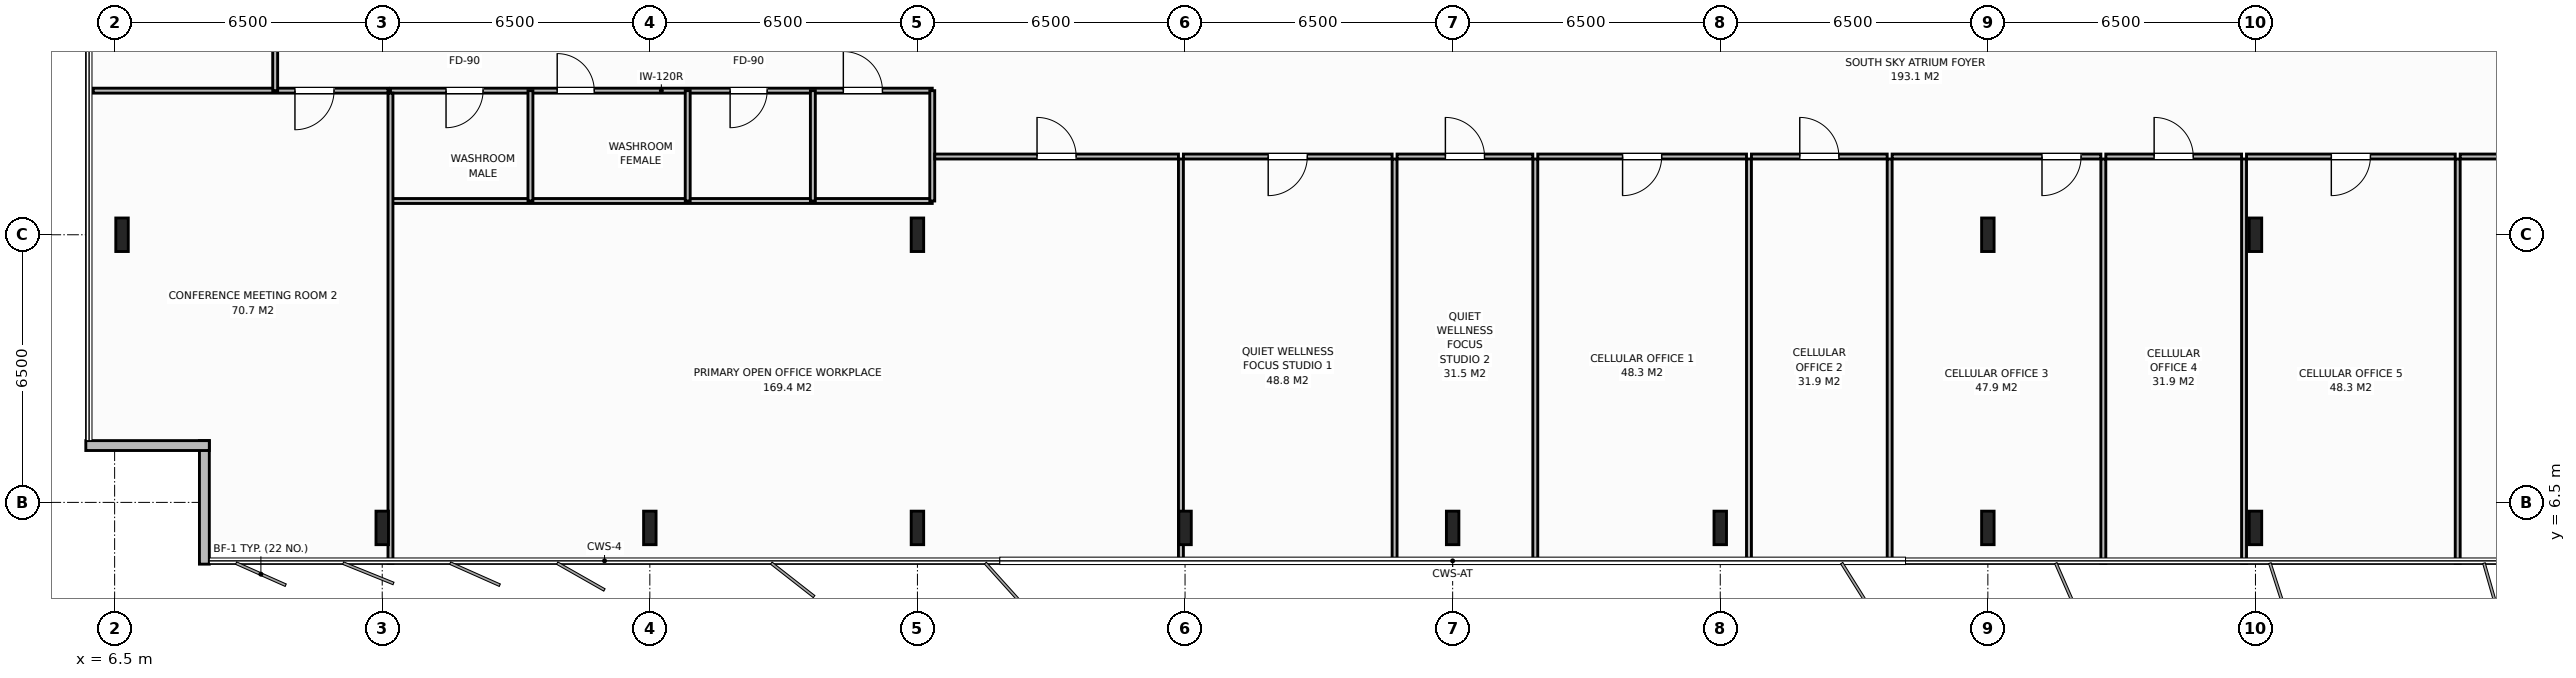
"""IFC4 building model, lengths in metres.
Left out: names, types, materials, properties, quantities, classifications, styles, units other than length and angle.
Written with IfcOpenShell. Run it as: python <this file> out.ifc"""

import sys

from ifc_helpers import new_model, si_unit, direction, frame, frame_2d, origin, origin_2d, place, context, subcontext, project, spatial, rectangle, i_section, extrude, element, fill, save


model = new_model("IFC4")
c1 = context("Model", 3, precision=1e-05, world=origin(), true_north=direction((0.0, 1.0)))
c2 = subcontext(c1, "Body", "Model", "MODEL_VIEW")
j1 = project(units=[si_unit("LENGTHUNIT", "METRE"), si_unit("PLANEANGLEUNIT", "RADIAN")], contexts=[c1])
p1 = place(None, origin())
s1 = spatial("IfcSite", under=j1, at=p1, CompositionType="ELEMENT")
p2 = place(p1, origin())
s2 = spatial("IfcBuilding", under=s1, at=p2, CompositionType="ELEMENT")
p3 = place(p2, frame((0.0, 0.0, 244.2)))
s3 = spatial("IfcBuildingStorey", under=s2, at=p3, CompositionType="ELEMENT", Elevation=244.2)
for number, where, z_axis, x_axis in (
    (1, (58.5, 13.0, 0.0), (0.0, 0.0, 1.0), (1.0, 0.0, 0.0)),
    (2, (26.0, 13.0, 0.0), (0.0, 0.0, 1.0), (1.0, 0.0, 0.0)),
    (3, (52.0, 13.0, 0.0), (0.0, 0.0, 1.0), (1.0, 0.0, 0.0)),
    (4, (13.0, 5.88, 0.0), (0.0, 0.0, 1.0), (1.0, 0.0, 0.0)),
    (5, (19.5, 5.88, 0.0), (0.0, 0.0, 1.0), (1.0, 0.0, 0.0)),
    (6, (26.0, 5.88, 0.0), (0.0, 0.0, 1.0), (1.0, 0.0, 0.0)),
    (7, (32.5, 5.88, 0.0), (0.0, 0.0, 1.0), (1.0, 0.0, 0.0)),
    (8, (39.0, 5.88, 0.0), (0.0, 0.0, 1.0), (1.0, 0.0, 0.0)),
    (9, (45.5, 5.88, 0.0), (0.0, 0.0, 1.0), (1.0, 0.0, 0.0)),
    (10, (52.0, 5.88, 0.0), (0.0, 0.0, 1.0), (1.0, 0.0, 0.0)),
    (11, (58.5, 5.88, 0.0), (0.0, 0.0, 1.0), (1.0, 0.0, 0.0)),
    (12, (6.68, 13.0, 0.0), (0.0, 0.0, 1.0), (1.0, 0.0, 0.0)),
):
    element("IfcColumn", number, at=place(p3, frame(where, z_axis=z_axis, x_axis=x_axis)), inside=s3, PredefinedType="COLUMN", context=c2, shape_type="SweptSolid", body=[
        extrude(i_section(OverallWidth=0.303, OverallDepth=0.814, WebThickness=0.021, FlangeThickness=0.04, at=origin_2d()), origin(), (0.0, 0.0, 1.0), 3.8),
    ])
for number, where, z_axis, x_axis in (
    (13, (8.68, 5.0, 0.0), (0.0, 0.0, 1.0), (0.0, 1.0, 0.0)),
    (14, (8.8, 7.88, 0.0), (0.0, 0.0, 1.0), (-1.0, 0.0, 0.0)),
):
    element("IfcWall", number, at=place(p3, frame(where, z_axis=z_axis, x_axis=x_axis)), inside=s3, PredefinedType="STANDARD", context=c2, shape_type="SweptSolid", body=[
        extrude(rectangle(XDim=3.0, YDim=0.24, at=frame_2d((1.5, 0.0))), origin(), (0.0, 0.0, 1.0), 3.58),
    ])
p4 = place(p3, frame((13.2, 16.5, 0.0), z_axis=(0.0, 0.0, 1.0), x_axis=(1.0, 0.0, 0.0)))
e15 = element("IfcWall", 15, at=p4, inside=s3, PredefinedType="PARTITIONING", context=c2, shape_type="SweptSolid", body=[
    extrude(rectangle(XDim=13.16, YDim=0.12, at=frame_2d((6.58, 0.0))), origin(), (0.0, 0.0, 1.0), 3.58),
])
p5 = place(p4, frame((1.35, 0.0, 0.0)))
e16 = element("IfcOpeningElement", 16, at=p5, cuts=e15, PredefinedType="OPENING", context=c2, shape_type="SweptSolid", body=[
    extrude(rectangle(XDim=0.9, YDim=2.15, at=frame_2d((0.45, 1.075))), frame((0.0, 0.07, 0.0), z_axis=(0.0, -1.0, 0.0), x_axis=(1.0, 0.0, 0.0)), (0.0, 0.0, 1.0), 0.14),
])
p6 = place(p4, frame((4.05, 0.0, 0.0)))
e17 = element("IfcOpeningElement", 17, at=p6, cuts=e15, PredefinedType="OPENING", context=c2, shape_type="SweptSolid", body=[
    extrude(rectangle(XDim=0.9, YDim=2.15, at=frame_2d((0.45, 1.075))), frame((0.0, 0.07, 0.0), z_axis=(0.0, -1.0, 0.0), x_axis=(1.0, 0.0, 0.0)), (0.0, 0.0, 1.0), 0.14),
])
p7 = place(p4, frame((8.25, 0.0, 0.0)))
e18 = element("IfcOpeningElement", 18, at=p7, cuts=e15, PredefinedType="OPENING", context=c2, shape_type="SweptSolid", body=[
    extrude(rectangle(XDim=0.9, YDim=2.15, at=frame_2d((0.45, 1.075))), frame((0.0, 0.07, 0.0), z_axis=(0.0, -1.0, 0.0), x_axis=(1.0, 0.0, 0.0)), (0.0, 0.0, 1.0), 0.14),
])
p8 = place(p4, frame((11.0, 0.0, 0.0)))
e19 = element("IfcOpeningElement", 19, at=p8, cuts=e15, PredefinedType="OPENING", context=c2, shape_type="SweptSolid", body=[
    extrude(rectangle(XDim=0.95, YDim=2.15, at=frame_2d((0.475, 1.075))), frame((0.0, 0.07, 0.0), z_axis=(0.0, -1.0, 0.0), x_axis=(1.0, 0.0, 0.0)), (0.0, 0.0, 1.0), 0.14),
])
p9 = place(p3, frame((13.2, 13.82, 0.0), z_axis=(0.0, 0.0, 1.0), x_axis=(1.0, 0.0, 0.0)))
e20 = element("IfcWall", 20, at=p9, inside=s3, PredefinedType="PARTITIONING", context=c2, shape_type="SweptSolid", body=[
    extrude(rectangle(XDim=13.16, YDim=0.12, at=frame_2d((6.58, 0.0))), origin(), (0.0, 0.0, 1.0), 3.58),
])
for number, where, z_axis, x_axis in (
    (21, (16.6, 13.82, 0.0), (0.0, 0.0, 1.0), (0.0, 1.0, 0.0)),
    (22, (20.42, 13.82, 0.0), (0.0, 0.0, 1.0), (0.0, 1.0, 0.0)),
    (23, (23.46, 13.82, 0.0), (0.0, 0.0, 1.0), (0.0, 1.0, 0.0)),
    (24, (26.36, 13.82, 0.0), (0.0, 0.0, 1.0), (0.0, 1.0, 0.0)),
):
    element("IfcWall", number, at=place(p3, frame(where, z_axis=z_axis, x_axis=x_axis)), inside=s3, PredefinedType="PARTITIONING", context=c2, shape_type="SweptSolid", body=[
        extrude(rectangle(XDim=2.68, YDim=0.12, at=frame_2d((1.34, 0.0))), origin(), (0.0, 0.0, 1.0), 3.58),
    ])
p10 = place(p3, frame((13.2, 5.02, 0.0), z_axis=(0.0, 0.0, 1.0), x_axis=(0.0, 1.0, 0.0)))
e25 = element("IfcWall", 25, at=p10, inside=s3, PredefinedType="PARTITIONING", context=c2, shape_type="SweptSolid", body=[
    extrude(rectangle(XDim=11.42, YDim=0.12, at=frame_2d((5.71, 0.0))), origin(), (0.0, 0.0, 1.0), 2.88),
])
p11 = place(p3, frame((5.98, 16.5, 0.0), z_axis=(0.0, 0.0, 1.0), x_axis=(1.0, 0.0, 0.0)))
e26 = element("IfcWall", 26, at=p11, inside=s3, PredefinedType="PARTITIONING", context=c2, shape_type="SweptSolid", body=[
    extrude(rectangle(XDim=7.16, YDim=0.12, at=frame_2d((3.58, 0.0))), origin(), (0.0, 0.0, 1.0), 3.58),
])
p12 = place(p11, frame((4.9, 0.0, 0.0)))
e27 = element("IfcOpeningElement", 27, at=p12, cuts=e26, PredefinedType="OPENING", context=c2, shape_type="SweptSolid", body=[
    extrude(rectangle(XDim=0.95, YDim=2.15, at=frame_2d((0.475, 1.075))), frame((0.0, 0.07, 0.0), z_axis=(0.0, -1.0, 0.0), x_axis=(1.0, 0.0, 0.0)), (0.0, 0.0, 1.0), 0.14),
])
p13 = place(p3, frame((32.4, 5.02, 0.0), z_axis=(0.0, 0.0, 1.0), x_axis=(0.0, 1.0, 0.0)))
e28 = element("IfcWall", 28, at=p13, inside=s3, PredefinedType="PARTITIONING", context=c2, shape_type="SweptSolid", body=[
    extrude(rectangle(XDim=9.82, YDim=0.12, at=frame_2d((4.91, 0.0))), origin(), (0.0, 0.0, 1.0), 2.88),
])
p14 = place(p3, frame((26.42, 14.9, 0.0), z_axis=(0.0, 0.0, 1.0), x_axis=(1.0, 0.0, 0.0)))
e29 = element("IfcWall", 29, at=p14, inside=s3, PredefinedType="PARTITIONING", context=c2, shape_type="SweptSolid", body=[
    extrude(rectangle(XDim=5.92, YDim=0.12, at=frame_2d((2.96, 0.0))), origin(), (0.0, 0.0, 1.0), 3.58),
])
p15 = place(p14, frame((2.485, 0.0, 0.0)))
e30 = element("IfcOpeningElement", 30, at=p15, cuts=e29, PredefinedType="OPENING", context=c2, shape_type="SweptSolid", body=[
    extrude(rectangle(XDim=0.95, YDim=2.15, at=frame_2d((0.475, 1.075))), frame((0.0, 0.07, 0.0), z_axis=(0.0, -1.0, 0.0), x_axis=(1.0, 0.0, 0.0)), (0.0, 0.0, 1.0), 0.14),
])
p16 = place(p3, frame((37.59, 5.02, 0.0), z_axis=(0.0, 0.0, 1.0), x_axis=(0.0, 1.0, 0.0)))
e31 = element("IfcWall", 31, at=p16, inside=s3, PredefinedType="PARTITIONING", context=c2, shape_type="SweptSolid", body=[
    extrude(rectangle(XDim=9.82, YDim=0.12, at=frame_2d((4.91, 0.0))), origin(), (0.0, 0.0, 1.0), 3.58),
])
p17 = place(p3, frame((32.46, 14.9, 0.0), z_axis=(0.0, 0.0, 1.0), x_axis=(1.0, 0.0, 0.0)))
e32 = element("IfcWall", 32, at=p17, inside=s3, PredefinedType="PARTITIONING", context=c2, shape_type="SweptSolid", body=[
    extrude(rectangle(XDim=5.07, YDim=0.12, at=frame_2d((2.535, 0.0))), origin(), (0.0, 0.0, 1.0), 3.58),
])
p18 = place(p17, frame((2.06, 0.0, 0.0)))
e33 = element("IfcOpeningElement", 33, at=p18, cuts=e32, PredefinedType="OPENING", context=c2, shape_type="SweptSolid", body=[
    extrude(rectangle(XDim=0.95, YDim=2.15, at=frame_2d((0.475, 1.075))), frame((0.0, 0.07, 0.0), z_axis=(0.0, -1.0, 0.0), x_axis=(1.0, 0.0, 0.0)), (0.0, 0.0, 1.0), 0.14),
])
p19 = place(p3, frame((41.008, 5.02, 0.0), z_axis=(0.0, 0.0, 1.0), x_axis=(0.0, 1.0, 0.0)))
e34 = element("IfcWall", 34, at=p19, inside=s3, PredefinedType="PARTITIONING", context=c2, shape_type="SweptSolid", body=[
    extrude(rectangle(XDim=9.82, YDim=0.12, at=frame_2d((4.91, 0.0))), origin(), (0.0, 0.0, 1.0), 3.58),
])
p20 = place(p3, frame((37.65, 14.9, 0.0), z_axis=(0.0, 0.0, 1.0), x_axis=(1.0, 0.0, 0.0)))
e35 = element("IfcWall", 35, at=p20, inside=s3, PredefinedType="PARTITIONING", context=c2, shape_type="SweptSolid", body=[
    extrude(rectangle(XDim=3.298, YDim=0.12, at=frame_2d((1.649, 0.0))), origin(), (0.0, 0.0, 1.0), 3.58),
])
p21 = place(p20, frame((1.174, 0.0, 0.0)))
e36 = element("IfcOpeningElement", 36, at=p21, cuts=e35, PredefinedType="OPENING", context=c2, shape_type="SweptSolid", body=[
    extrude(rectangle(XDim=0.95, YDim=2.15, at=frame_2d((0.475, 1.075))), frame((0.0, 0.07, 0.0), z_axis=(0.0, -1.0, 0.0), x_axis=(1.0, 0.0, 0.0)), (0.0, 0.0, 1.0), 0.14),
])
p22 = place(p3, frame((46.198, 5.02, 0.0), z_axis=(0.0, 0.0, 1.0), x_axis=(0.0, 1.0, 0.0)))
e37 = element("IfcWall", 37, at=p22, inside=s3, PredefinedType="PARTITIONING", context=c2, shape_type="SweptSolid", body=[
    extrude(rectangle(XDim=9.82, YDim=0.12, at=frame_2d((4.91, 0.0))), origin(), (0.0, 0.0, 1.0), 3.58),
])
p23 = place(p3, frame((41.067, 14.9, 0.0), z_axis=(0.0, 0.0, 1.0), x_axis=(1.0, 0.0, 0.0)))
e38 = element("IfcWall", 38, at=p23, inside=s3, PredefinedType="PARTITIONING", context=c2, shape_type="SweptSolid", body=[
    extrude(rectangle(XDim=5.07, YDim=0.12, at=frame_2d((2.535, 0.0))), origin(), (0.0, 0.0, 1.0), 3.58),
])
p24 = place(p23, frame((2.06, 0.0, 0.0)))
e39 = element("IfcOpeningElement", 39, at=p24, cuts=e38, PredefinedType="OPENING", context=c2, shape_type="SweptSolid", body=[
    extrude(rectangle(XDim=0.95, YDim=2.15, at=frame_2d((0.475, 1.075))), frame((0.0, 0.07, 0.0), z_axis=(0.0, -1.0, 0.0), x_axis=(1.0, 0.0, 0.0)), (0.0, 0.0, 1.0), 0.14),
])
p25 = place(p3, frame((49.615, 5.02, 0.0), z_axis=(0.0, 0.0, 1.0), x_axis=(0.0, 1.0, 0.0)))
e40 = element("IfcWall", 40, at=p25, inside=s3, PredefinedType="PARTITIONING", context=c2, shape_type="SweptSolid", body=[
    extrude(rectangle(XDim=9.82, YDim=0.12, at=frame_2d((4.91, 0.0))), origin(), (0.0, 0.0, 1.0), 3.58),
])
p26 = place(p3, frame((46.257, 14.9, 0.0), z_axis=(0.0, 0.0, 1.0), x_axis=(1.0, 0.0, 0.0)))
e41 = element("IfcWall", 41, at=p26, inside=s3, PredefinedType="PARTITIONING", context=c2, shape_type="SweptSolid", body=[
    extrude(rectangle(XDim=3.298, YDim=0.12, at=frame_2d((1.649, 0.0))), origin(), (0.0, 0.0, 1.0), 3.58),
])
p27 = place(p26, frame((1.174, 0.0, 0.0)))
e42 = element("IfcOpeningElement", 42, at=p27, cuts=e41, PredefinedType="OPENING", context=c2, shape_type="SweptSolid", body=[
    extrude(rectangle(XDim=0.95, YDim=2.15, at=frame_2d((0.475, 1.075))), frame((0.0, 0.07, 0.0), z_axis=(0.0, -1.0, 0.0), x_axis=(1.0, 0.0, 0.0)), (0.0, 0.0, 1.0), 0.14),
])
p28 = place(p3, frame((54.805, 5.02, 0.0), z_axis=(0.0, 0.0, 1.0), x_axis=(0.0, 1.0, 0.0)))
e43 = element("IfcWall", 43, at=p28, inside=s3, PredefinedType="PARTITIONING", context=c2, shape_type="SweptSolid", body=[
    extrude(rectangle(XDim=9.82, YDim=0.12, at=frame_2d((4.91, 0.0))), origin(), (0.0, 0.0, 1.0), 3.58),
])
p29 = place(p3, frame((49.675, 14.9, 0.0), z_axis=(0.0, 0.0, 1.0), x_axis=(1.0, 0.0, 0.0)))
e44 = element("IfcWall", 44, at=p29, inside=s3, PredefinedType="PARTITIONING", context=c2, shape_type="SweptSolid", body=[
    extrude(rectangle(XDim=5.07, YDim=0.12, at=frame_2d((2.535, 0.0))), origin(), (0.0, 0.0, 1.0), 3.58),
])
p30 = place(p29, frame((3.64, 0.0, 0.0)))
e45 = element("IfcOpeningElement", 45, at=p30, cuts=e44, PredefinedType="OPENING", context=c2, shape_type="SweptSolid", body=[
    extrude(rectangle(XDim=0.95, YDim=2.15, at=frame_2d((0.475, 1.075))), frame((0.0, 0.07, 0.0), z_axis=(0.0, -1.0, 0.0), x_axis=(1.0, 0.0, 0.0)), (0.0, 0.0, 1.0), 0.14),
])
p31 = place(p3, frame((58.223, 5.02, 0.0), z_axis=(0.0, 0.0, 1.0), x_axis=(0.0, 1.0, 0.0)))
e46 = element("IfcWall", 46, at=p31, inside=s3, PredefinedType="PARTITIONING", context=c2, shape_type="SweptSolid", body=[
    extrude(rectangle(XDim=9.82, YDim=0.12, at=frame_2d((4.91, 0.0))), origin(), (0.0, 0.0, 1.0), 3.58),
])
p32 = place(p3, frame((54.865, 14.9, 0.0), z_axis=(0.0, 0.0, 1.0), x_axis=(1.0, 0.0, 0.0)))
e47 = element("IfcWall", 47, at=p32, inside=s3, PredefinedType="PARTITIONING", context=c2, shape_type="SweptSolid", body=[
    extrude(rectangle(XDim=3.298, YDim=0.12, at=frame_2d((1.649, 0.0))), origin(), (0.0, 0.0, 1.0), 3.58),
])
p33 = place(p32, frame((1.174, 0.0, 0.0)))
e48 = element("IfcOpeningElement", 48, at=p33, cuts=e47, PredefinedType="OPENING", context=c2, shape_type="SweptSolid", body=[
    extrude(rectangle(XDim=0.95, YDim=2.15, at=frame_2d((0.475, 1.075))), frame((0.0, 0.07, 0.0), z_axis=(0.0, -1.0, 0.0), x_axis=(1.0, 0.0, 0.0)), (0.0, 0.0, 1.0), 0.14),
])
p34 = place(p3, frame((63.413, 5.02, 0.0), z_axis=(0.0, 0.0, 1.0), x_axis=(0.0, 1.0, 0.0)))
e49 = element("IfcWall", 49, at=p34, inside=s3, PredefinedType="PARTITIONING", context=c2, shape_type="SweptSolid", body=[
    extrude(rectangle(XDim=9.82, YDim=0.12, at=frame_2d((4.91, 0.0))), origin(), (0.0, 0.0, 1.0), 3.58),
])
p35 = place(p3, frame((58.283, 14.9, 0.0), z_axis=(0.0, 0.0, 1.0), x_axis=(1.0, 0.0, 0.0)))
e50 = element("IfcWall", 50, at=p35, inside=s3, PredefinedType="PARTITIONING", context=c2, shape_type="SweptSolid", body=[
    extrude(rectangle(XDim=5.07, YDim=0.12, at=frame_2d((2.535, 0.0))), origin(), (0.0, 0.0, 1.0), 3.58),
])
p36 = place(p35, frame((2.06, 0.0, 0.0)))
e51 = element("IfcOpeningElement", 51, at=p36, cuts=e50, PredefinedType="OPENING", context=c2, shape_type="SweptSolid", body=[
    extrude(rectangle(XDim=0.95, YDim=2.15, at=frame_2d((0.475, 1.075))), frame((0.0, 0.07, 0.0), z_axis=(0.0, -1.0, 0.0), x_axis=(1.0, 0.0, 0.0)), (0.0, 0.0, 1.0), 0.14),
])
p37 = place(p3, frame((63.472, 14.9, 0.0), z_axis=(0.0, 0.0, 1.0), x_axis=(1.0, 0.0, 0.0)))
e52 = element("IfcWall", 52, at=p37, inside=s3, PredefinedType="PARTITIONING", context=c2, shape_type="SweptSolid", body=[
    extrude(rectangle(XDim=3.298, YDim=0.12, at=frame_2d((1.649, 0.0))), origin(), (0.0, 0.0, 1.0), 3.58),
])
p38 = place(p37, frame((1.174, 0.0, 0.0)))
e53 = element("IfcOpeningElement", 53, at=p38, cuts=e52, PredefinedType="OPENING", context=c2, shape_type="SweptSolid", body=[
    extrude(rectangle(XDim=0.95, YDim=2.15, at=frame_2d((0.475, 1.075))), frame((0.0, 0.07, 0.0), z_axis=(0.0, -1.0, 0.0), x_axis=(1.0, 0.0, 0.0)), (0.0, 0.0, 1.0), 0.14),
])
p39 = place(p3, frame((10.4, 16.5, 0.0), z_axis=(0.0, 0.0, 1.0), x_axis=(0.0, 1.0, 0.0)))
e54 = element("IfcWall", 54, at=p39, inside=s3, PredefinedType="PARTITIONING", context=c2, shape_type="SweptSolid", body=[
    extrude(rectangle(XDim=19.0, YDim=0.12, at=frame_2d((9.5, 0.0))), origin(), (0.0, 0.0, 1.0), 3.58),
])
p40 = place(p39, frame((9.025, 0.0, 0.0)))
e55 = element("IfcOpeningElement", 55, at=p40, cuts=e54, PredefinedType="OPENING", context=c2, shape_type="SweptSolid", body=[
    extrude(rectangle(XDim=0.95, YDim=2.15, at=frame_2d((0.475, 1.075))), frame((0.0, 0.07, 0.0), z_axis=(0.0, -1.0, 0.0), x_axis=(1.0, 0.0, 0.0)), (0.0, 0.0, 1.0), 0.14),
])
p41 = place(p5, origin())
e56 = element("IfcDoor", 56, at=p41, inside=s3, OperationType="SINGLE_SWING_RIGHT", PredefinedType="DOOR", context=c2, shape_type="SweptSolid", body=[
    extrude(rectangle(XDim=0.9, YDim=2.15, at=frame_2d((0.45, 1.075))), frame((0.0, 0.025, 0.0), z_axis=(0.0, -1.0, 0.0), x_axis=(1.0, 0.0, 0.0)), (0.0, 0.0, 1.0), 0.05),
])
fill(e16, e56)
p42 = place(p6, origin())
e57 = element("IfcDoor", 57, at=p42, inside=s3, OperationType="SINGLE_SWING_LEFT", PredefinedType="DOOR", context=c2, shape_type="SweptSolid", body=[
    extrude(rectangle(XDim=0.9, YDim=2.15, at=frame_2d((0.45, 1.075))), frame((0.0, 0.025, 0.0), z_axis=(0.0, -1.0, 0.0), x_axis=(1.0, 0.0, 0.0)), (0.0, 0.0, 1.0), 0.05),
])
fill(e17, e57)
p43 = place(p7, origin())
e58 = element("IfcDoor", 58, at=p43, inside=s3, OperationType="SINGLE_SWING_RIGHT", PredefinedType="DOOR", context=c2, shape_type="SweptSolid", body=[
    extrude(rectangle(XDim=0.9, YDim=2.15, at=frame_2d((0.45, 1.075))), frame((0.0, 0.025, 0.0), z_axis=(0.0, -1.0, 0.0), x_axis=(1.0, 0.0, 0.0)), (0.0, 0.0, 1.0), 0.05),
])
fill(e18, e58)
p44 = place(p8, origin())
e59 = element("IfcDoor", 59, at=p44, inside=s3, OperationType="SINGLE_SWING_LEFT", PredefinedType="DOOR", context=c2, shape_type="SweptSolid", body=[
    extrude(rectangle(XDim=0.95, YDim=2.15, at=frame_2d((0.475, 1.075))), frame((0.0, 0.025, 0.0), z_axis=(0.0, -1.0, 0.0), x_axis=(1.0, 0.0, 0.0)), (0.0, 0.0, 1.0), 0.05),
])
fill(e19, e59)
p45 = place(p12, origin())
e60 = element("IfcDoor", 60, at=p45, inside=s3, OperationType="SINGLE_SWING_RIGHT", PredefinedType="DOOR", context=c2, shape_type="SweptSolid", body=[
    extrude(rectangle(XDim=0.95, YDim=2.15, at=frame_2d((0.475, 1.075))), frame((0.0, 0.025, 0.0), z_axis=(0.0, -1.0, 0.0), x_axis=(1.0, 0.0, 0.0)), (0.0, 0.0, 1.0), 0.05),
])
fill(e27, e60)
p46 = place(p15, origin())
e61 = element("IfcDoor", 61, at=p46, inside=s3, OperationType="SINGLE_SWING_LEFT", PredefinedType="DOOR", context=c2, shape_type="SweptSolid", body=[
    extrude(rectangle(XDim=0.95, YDim=2.15, at=frame_2d((0.475, 1.075))), frame((0.0, 0.025, 0.0), z_axis=(0.0, -1.0, 0.0), x_axis=(1.0, 0.0, 0.0)), (0.0, 0.0, 1.0), 0.05),
])
fill(e30, e61)
p47 = place(p18, origin())
e62 = element("IfcDoor", 62, at=p47, inside=s3, OperationType="SINGLE_SWING_RIGHT", PredefinedType="DOOR", context=c2, shape_type="SweptSolid", body=[
    extrude(rectangle(XDim=0.95, YDim=2.15, at=frame_2d((0.475, 1.075))), frame((0.0, 0.025, 0.0), z_axis=(0.0, -1.0, 0.0), x_axis=(1.0, 0.0, 0.0)), (0.0, 0.0, 1.0), 0.05),
])
fill(e33, e62)
p48 = place(p21, origin())
e63 = element("IfcDoor", 63, at=p48, inside=s3, OperationType="SINGLE_SWING_LEFT", PredefinedType="DOOR", context=c2, shape_type="SweptSolid", body=[
    extrude(rectangle(XDim=0.95, YDim=2.15, at=frame_2d((0.475, 1.075))), frame((0.0, 0.025, 0.0), z_axis=(0.0, -1.0, 0.0), x_axis=(1.0, 0.0, 0.0)), (0.0, 0.0, 1.0), 0.05),
])
fill(e36, e63)
p49 = place(p24, origin())
e64 = element("IfcDoor", 64, at=p49, inside=s3, OperationType="SINGLE_SWING_RIGHT", PredefinedType="DOOR", context=c2, shape_type="SweptSolid", body=[
    extrude(rectangle(XDim=0.95, YDim=2.15, at=frame_2d((0.475, 1.075))), frame((0.0, 0.025, 0.0), z_axis=(0.0, -1.0, 0.0), x_axis=(1.0, 0.0, 0.0)), (0.0, 0.0, 1.0), 0.05),
])
fill(e39, e64)
p50 = place(p27, origin())
e65 = element("IfcDoor", 65, at=p50, inside=s3, OperationType="SINGLE_SWING_LEFT", PredefinedType="DOOR", context=c2, shape_type="SweptSolid", body=[
    extrude(rectangle(XDim=0.95, YDim=2.15, at=frame_2d((0.475, 1.075))), frame((0.0, 0.025, 0.0), z_axis=(0.0, -1.0, 0.0), x_axis=(1.0, 0.0, 0.0)), (0.0, 0.0, 1.0), 0.05),
])
fill(e42, e65)
p51 = place(p30, origin())
e66 = element("IfcDoor", 66, at=p51, inside=s3, OperationType="SINGLE_SWING_RIGHT", PredefinedType="DOOR", context=c2, shape_type="SweptSolid", body=[
    extrude(rectangle(XDim=0.95, YDim=2.15, at=frame_2d((0.475, 1.075))), frame((0.0, 0.025, 0.0), z_axis=(0.0, -1.0, 0.0), x_axis=(1.0, 0.0, 0.0)), (0.0, 0.0, 1.0), 0.05),
])
fill(e45, e66)
p52 = place(p33, origin())
e67 = element("IfcDoor", 67, at=p52, inside=s3, OperationType="SINGLE_SWING_LEFT", PredefinedType="DOOR", context=c2, shape_type="SweptSolid", body=[
    extrude(rectangle(XDim=0.95, YDim=2.15, at=frame_2d((0.475, 1.075))), frame((0.0, 0.025, 0.0), z_axis=(0.0, -1.0, 0.0), x_axis=(1.0, 0.0, 0.0)), (0.0, 0.0, 1.0), 0.05),
])
fill(e48, e67)
p53 = place(p36, origin())
e68 = element("IfcDoor", 68, at=p53, inside=s3, OperationType="SINGLE_SWING_RIGHT", PredefinedType="DOOR", context=c2, shape_type="SweptSolid", body=[
    extrude(rectangle(XDim=0.95, YDim=2.15, at=frame_2d((0.475, 1.075))), frame((0.0, 0.025, 0.0), z_axis=(0.0, -1.0, 0.0), x_axis=(1.0, 0.0, 0.0)), (0.0, 0.0, 1.0), 0.05),
])
fill(e51, e68)
save(model, sys.argv[1])
